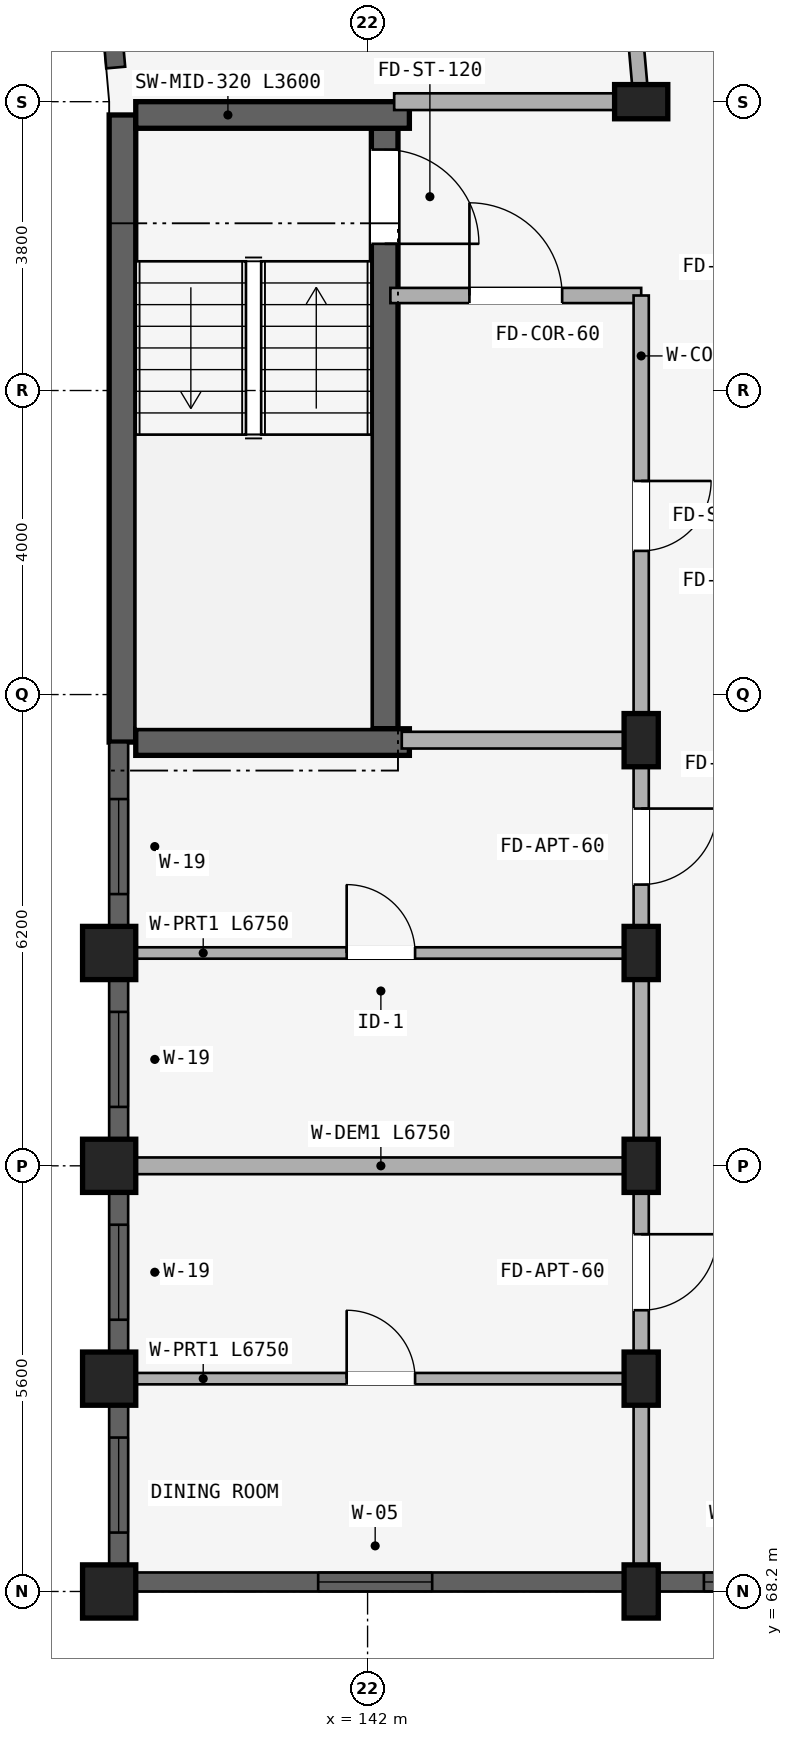
"""IFC4 building model, lengths in metres.
Left out: names, types, materials, properties, quantities, classifications, styles, units other than length and angle.
Written with IfcOpenShell. Run it as: python <this file> out.ifc"""

import sys

from ifc_helpers import new_model, si_unit, direction, frame, frame_2d, origin, origin_2d, place, context, subcontext, project, spatial, rectangle, extrude, element, fill, save


model = new_model("IFC4")
c1 = context("Model", 3, precision=1e-05, world=origin(), true_north=direction((0.0, 1.0)))
c2 = subcontext(c1, "Body", "Model", "MODEL_VIEW")
j1 = project(units=[si_unit("LENGTHUNIT", "METRE"), si_unit("PLANEANGLEUNIT", "RADIAN")], contexts=[c1])
p1 = place(None, origin())
s1 = spatial("IfcSite", under=j1, at=p1, CompositionType="ELEMENT")
p2 = place(p1, origin())
s2 = spatial("IfcBuilding", under=s1, at=p2, CompositionType="ELEMENT")
p3 = place(p2, frame((0.0, 0.0, 24.45)))
s3 = spatial("IfcBuildingStorey", under=s2, at=p3, CompositionType="ELEMENT", Elevation=24.45)
p4 = place(p3, frame((138.775, 87.625, 0.0), z_axis=(0.0, 0.0, 1.0), x_axis=(0.0, -1.0, 0.0)))
e1 = element("IfcWall", 1, at=p4, inside=s3, PredefinedType="SHEAR", context=c2, shape_type="SweptSolid", body=[
    extrude(rectangle(XDim=8.25, YDim=0.35, at=frame_2d((4.125, 0.0))), origin(), (0.0, 0.0, 1.0), 2.93),
])
p5 = place(p3, frame((142.225, 87.45, 0.0), z_axis=(0.0, 0.0, 1.0), x_axis=(0.0, -1.0, 0.0)))
e2 = element("IfcWall", 2, at=p5, inside=s3, PredefinedType="SHEAR", context=c2, shape_type="SweptSolid", body=[
    extrude(rectangle(XDim=7.9, YDim=0.35, at=frame_2d((3.95, 0.0))), origin(), (0.0, 0.0, 1.0), 2.93),
])
p6 = place(p5, frame((0.28, 0.0, 0.0)))
e3 = element("IfcOpeningElement", 3, at=p6, cuts=e2, PredefinedType="OPENING", context=c2, shape_type="SweptSolid", body=[
    extrude(rectangle(XDim=1.24, YDim=2.15, at=frame_2d((0.62, 1.075))), frame((0.0, 0.185, 0.0), z_axis=(0.0, -1.0, 0.0), x_axis=(1.0, 0.0, 0.0)), (0.0, 0.0, 1.0), 0.37),
])
for number, where, z_axis, x_axis in (
    (4, (138.95, 87.625, 0.0), (0.0, 0.0, 1.0), (1.0, 0.0, 0.0)),
    (5, (138.95, 79.375, 0.0), (0.0, 0.0, 1.0), (1.0, 0.0, 0.0)),
):
    element("IfcWall", number, at=place(p3, frame(where, z_axis=z_axis, x_axis=x_axis)), inside=s3, PredefinedType="SHEAR", context=c2, shape_type="SweptSolid", body=[
        extrude(rectangle(XDim=3.6, YDim=0.35, at=frame_2d((1.8, 0.0))), origin(), (0.0, 0.0, 1.0), 2.93),
    ])
for number, where, z_axis, x_axis in (
    (6, (145.6, 87.8, 0.0), (0.0, 0.0, 1.0), (0.0, 1.0, 0.0)),
    (7, (145.6, 79.4, 0.0), (0.0, 0.0, 1.0), (1.0, 0.0, 0.0)),
):
    element("IfcColumn", number, at=place(p3, frame(where, z_axis=z_axis, x_axis=x_axis)), inside=s3, PredefinedType="COLUMN", context=c2, shape_type="SweptSolid", body=[
        extrude(rectangle(XDim=0.45, YDim=0.7, at=origin_2d()), origin(), (0.0, 0.0, 1.0), 2.93),
    ])
p7 = place(p3, frame((138.6, 76.6, 0.0), z_axis=(0.0, 0.0, 1.0), x_axis=(1.0, 0.0, 0.0)))
e8 = element("IfcColumn", 8, at=p7, inside=s3, PredefinedType="COLUMN", context=c2, shape_type="SweptSolid", body=[
    extrude(rectangle(XDim=0.7, YDim=0.7, at=origin_2d()), origin(), (0.0, 0.0, 1.0), 2.93),
])
p8 = place(p3, frame((145.6, 76.6, 0.0), z_axis=(0.0, 0.0, 1.0), x_axis=(1.0, 0.0, 0.0)))
e9 = element("IfcColumn", 9, at=p8, inside=s3, PredefinedType="COLUMN", context=c2, shape_type="SweptSolid", body=[
    extrude(rectangle(XDim=0.45, YDim=0.7, at=origin_2d()), origin(), (0.0, 0.0, 1.0), 2.93),
])
p9 = place(p3, frame((138.6, 73.8, 0.0), z_axis=(0.0, 0.0, 1.0), x_axis=(1.0, 0.0, 0.0)))
e10 = element("IfcColumn", 10, at=p9, inside=s3, PredefinedType="COLUMN", context=c2, shape_type="SweptSolid", body=[
    extrude(rectangle(XDim=0.7, YDim=0.7, at=origin_2d()), origin(), (0.0, 0.0, 1.0), 2.93),
])
p10 = place(p3, frame((145.6, 73.8, 0.0), z_axis=(0.0, 0.0, 1.0), x_axis=(1.0, 0.0, 0.0)))
e11 = element("IfcColumn", 11, at=p10, inside=s3, PredefinedType="COLUMN", context=c2, shape_type="SweptSolid", body=[
    extrude(rectangle(XDim=0.45, YDim=0.7, at=origin_2d()), origin(), (0.0, 0.0, 1.0), 2.93),
])
p11 = place(p3, frame((138.6, 71.0, 0.0), z_axis=(0.0, 0.0, 1.0), x_axis=(1.0, 0.0, 0.0)))
e12 = element("IfcColumn", 12, at=p11, inside=s3, PredefinedType="COLUMN", context=c2, shape_type="SweptSolid", body=[
    extrude(rectangle(XDim=0.7, YDim=0.7, at=origin_2d()), origin(), (0.0, 0.0, 1.0), 2.93),
])
p12 = place(p3, frame((145.6, 71.0, 0.0), z_axis=(0.0, 0.0, 1.0), x_axis=(1.0, 0.0, 0.0)))
e13 = element("IfcColumn", 13, at=p12, inside=s3, PredefinedType="COLUMN", context=c2, shape_type="SweptSolid", body=[
    extrude(rectangle(XDim=0.45, YDim=0.7, at=origin_2d()), origin(), (0.0, 0.0, 1.0), 2.93),
])
p13 = place(p3, frame((138.6, 68.2, 0.0), z_axis=(0.0, 0.0, 1.0), x_axis=(1.0, 0.0, 0.0)))
e14 = element("IfcColumn", 14, at=p13, inside=s3, PredefinedType="COLUMN", context=c2, shape_type="SweptSolid", body=[
    extrude(rectangle(XDim=0.7, YDim=0.7, at=origin_2d()), origin(), (0.0, 0.0, 1.0), 2.97),
])
p14 = place(p3, frame((145.6, 68.2, 0.0), z_axis=(0.0, 0.0, 1.0), x_axis=(1.0, 0.0, 0.0)))
e15 = element("IfcColumn", 15, at=p14, inside=s3, PredefinedType="COLUMN", context=c2, shape_type="SweptSolid", body=[
    extrude(rectangle(XDim=0.45, YDim=0.7, at=origin_2d()), origin(), (0.0, 0.0, 1.0), 2.97),
])
p15 = place(p3, frame((142.3, 85.25, 0.0), z_axis=(0.0, 0.0, 1.0), x_axis=(1.0, 0.0, 0.0)))
e16 = element("IfcWall", 16, at=p15, inside=s3, PredefinedType="STANDARD", context=c2, shape_type="SweptSolid", body=[
    extrude(rectangle(XDim=3.3, YDim=0.2, at=frame_2d((1.65, 0.0))), origin(), (0.0, 0.0, 1.0), 2.372),
])
p16 = place(p15, frame((1.04, 0.0, 0.0)))
e17 = element("IfcOpeningElement", 17, at=p16, cuts=e16, PredefinedType="OPENING", context=c2, shape_type="SweptSolid", body=[
    extrude(rectangle(XDim=1.22, YDim=2.15, at=frame_2d((0.61, 1.075))), frame((0.0, 0.11, 0.0), z_axis=(0.0, -1.0, 0.0), x_axis=(1.0, 0.0, 0.0)), (0.0, 0.0, 1.0), 0.22),
])
p17 = place(p3, frame((145.6, 85.25, 0.0), z_axis=(0.0, 0.0, 1.0), x_axis=(0.0, -1.0, 0.0)))
e18 = element("IfcWall", 18, at=p17, inside=s3, PredefinedType="STANDARD", context=c2, shape_type="SweptSolid", body=[
    extrude(rectangle(XDim=5.8, YDim=0.2, at=frame_2d((2.9, 0.0))), origin(), (0.0, 0.0, 1.0), 2.372),
])
p18 = place(p17, frame((2.44, 0.0, 0.0)))
e19 = element("IfcOpeningElement", 19, at=p18, cuts=e18, PredefinedType="OPENING", context=c2, shape_type="SweptSolid", body=[
    extrude(rectangle(XDim=0.92, YDim=2.1, at=frame_2d((0.46, 1.05))), frame((0.0, 0.11, 0.0), z_axis=(0.0, -1.0, 0.0), x_axis=(1.0, 0.0, 0.0)), (0.0, 0.0, 1.0), 0.22),
])
p19 = place(p3, frame((145.208, 92.28, 0.0), z_axis=(0.0, 0.0, 1.0), x_axis=(0.087187153726, -0.996191949488, 0.0)))
e20 = element("IfcWall", 20, at=p19, inside=s3, PredefinedType="STANDARD", context=c2, shape_type="SweptSolid", body=[
    extrude(rectangle(XDim=4.497, YDim=0.2, at=frame_2d((2.249, 0.0))), origin(), (0.0, 0.0, 1.0), 2.372),
])
p20 = place(p3, frame((142.35, 87.8, 0.0), z_axis=(0.0, 0.0, 1.0), x_axis=(1.0, 0.0, 0.0)))
e21 = element("IfcWall", 21, at=p20, inside=s3, PredefinedType="STANDARD", context=c2, shape_type="SweptSolid", body=[
    extrude(rectangle(XDim=3.2, YDim=0.22, at=frame_2d((1.6, 0.0))), origin(), (0.0, 0.0, 1.0), 2.372),
])
p21 = place(p3, frame((145.6, 79.4, 0.0), z_axis=(0.0, 0.0, 1.0), x_axis=(0.0, -1.0, 0.0)))
e22 = element("IfcWall", 22, at=p21, inside=s3, PredefinedType="STANDARD", context=c2, shape_type="SweptSolid", body=[
    extrude(rectangle(XDim=2.8, YDim=0.2, at=frame_2d((1.4, 0.0))), origin(), (0.0, 0.0, 1.0), 2.372),
])
p22 = place(p21, frame((0.9, 0.0, 0.0)))
e23 = element("IfcOpeningElement", 23, at=p22, cuts=e22, PredefinedType="OPENING", context=c2, shape_type="SweptSolid", body=[
    extrude(rectangle(XDim=1.0, YDim=2.15, at=frame_2d((0.5, 1.075))), frame((0.0, 0.11, 0.0), z_axis=(0.0, -1.0, 0.0), x_axis=(1.0, 0.0, 0.0)), (0.0, 0.0, 1.0), 0.22),
])
p23 = place(p3, frame((142.45, 79.4, 0.0), z_axis=(0.0, 0.0, 1.0), x_axis=(1.0, 0.0, 0.0)))
e24 = element("IfcWall", 24, at=p23, inside=s3, PredefinedType="STANDARD", context=c2, shape_type="SweptSolid", body=[
    extrude(rectangle(XDim=3.1, YDim=0.22, at=frame_2d((1.55, 0.0))), origin(), (0.0, 0.0, 1.0), 2.372),
])
p24 = place(p3, frame((145.6, 76.6, 0.0), z_axis=(0.0, 0.0, 1.0), x_axis=(0.0, -1.0, 0.0)))
e25 = element("IfcWall", 25, at=p24, inside=s3, PredefinedType="STANDARD", context=c2, shape_type="SweptSolid", body=[
    extrude(rectangle(XDim=2.8, YDim=0.2, at=frame_2d((1.4, 0.0))), origin(), (0.0, 0.0, 1.0), 2.372),
])
p25 = place(p3, frame((138.8, 76.6, 0.0), z_axis=(0.0, 0.0, 1.0), x_axis=(1.0, 0.0, 0.0)))
e26 = element("IfcWall", 26, at=p25, inside=s3, PredefinedType="PARTITIONING", context=c2, shape_type="SweptSolid", body=[
    extrude(rectangle(XDim=6.75, YDim=0.15, at=frame_2d((3.375, 0.0))), origin(), (0.0, 0.0, 1.0), 2.372),
])
p26 = place(p25, frame((2.925, 0.0, 0.0)))
e27 = element("IfcOpeningElement", 27, at=p26, cuts=e26, PredefinedType="OPENING", context=c2, shape_type="SweptSolid", body=[
    extrude(rectangle(XDim=0.9, YDim=2.1, at=frame_2d((0.45, 1.05))), frame((0.0, 0.085, 0.0), z_axis=(0.0, -1.0, 0.0), x_axis=(1.0, 0.0, 0.0)), (0.0, 0.0, 1.0), 0.17),
])
p27 = place(p3, frame((145.6, 73.8, 0.0), z_axis=(0.0, 0.0, 1.0), x_axis=(0.0, -1.0, 0.0)))
e28 = element("IfcWall", 28, at=p27, inside=s3, PredefinedType="STANDARD", context=c2, shape_type="SweptSolid", body=[
    extrude(rectangle(XDim=2.8, YDim=0.2, at=frame_2d((1.4, 0.0))), origin(), (0.0, 0.0, 1.0), 2.372),
])
p28 = place(p27, frame((0.9, 0.0, 0.0)))
e29 = element("IfcOpeningElement", 29, at=p28, cuts=e28, PredefinedType="OPENING", context=c2, shape_type="SweptSolid", body=[
    extrude(rectangle(XDim=1.0, YDim=2.15, at=frame_2d((0.5, 1.075))), frame((0.0, 0.11, 0.0), z_axis=(0.0, -1.0, 0.0), x_axis=(1.0, 0.0, 0.0)), (0.0, 0.0, 1.0), 0.22),
])
p29 = place(p3, frame((138.8, 73.8, 0.0), z_axis=(0.0, 0.0, 1.0), x_axis=(1.0, 0.0, 0.0)))
e30 = element("IfcWall", 30, at=p29, inside=s3, PredefinedType="STANDARD", context=c2, shape_type="SweptSolid", body=[
    extrude(rectangle(XDim=6.75, YDim=0.22, at=frame_2d((3.375, 0.0))), origin(), (0.0, 0.0, 1.0), 2.372),
])
p30 = place(p3, frame((145.6, 71.0, 0.0), z_axis=(0.0, 0.0, 1.0), x_axis=(0.0, -1.0, 0.0)))
e31 = element("IfcWall", 31, at=p30, inside=s3, PredefinedType="STANDARD", context=c2, shape_type="SweptSolid", body=[
    extrude(rectangle(XDim=2.8, YDim=0.2, at=frame_2d((1.4, 0.0))), origin(), (0.0, 0.0, 1.0), 2.372),
])
p31 = place(p3, frame((138.8, 71.0, 0.0), z_axis=(0.0, 0.0, 1.0), x_axis=(1.0, 0.0, 0.0)))
e32 = element("IfcWall", 32, at=p31, inside=s3, PredefinedType="PARTITIONING", context=c2, shape_type="SweptSolid", body=[
    extrude(rectangle(XDim=6.75, YDim=0.15, at=frame_2d((3.375, 0.0))), origin(), (0.0, 0.0, 1.0), 2.372),
])
p32 = place(p31, frame((2.925, 0.0, 0.0)))
e33 = element("IfcOpeningElement", 33, at=p32, cuts=e32, PredefinedType="OPENING", context=c2, shape_type="SweptSolid", body=[
    extrude(rectangle(XDim=0.9, YDim=2.1, at=frame_2d((0.45, 1.05))), frame((0.0, 0.085, 0.0), z_axis=(0.0, -1.0, 0.0), x_axis=(1.0, 0.0, 0.0)), (0.0, 0.0, 1.0), 0.17),
])
p33 = place(p3, frame((138.461, 90.823, 0.0), z_axis=(0.0, 0.0, 1.0), x_axis=(0.087229084652, -0.996188278786, 0.0)))
e34 = element("IfcWall", 34, at=p33, inside=s3, PredefinedType="STANDARD", context=c2, shape_type="SweptSolid", body=[
    extrude(rectangle(XDim=2.583, YDim=0.25, at=frame_2d((1.292, 0.0))), origin(), (0.0, 0.0, 1.0), 2.422),
])
p34 = place(p33, frame((0.61, 0.0, 0.622)))
e35 = element("IfcOpeningElement", 35, at=p34, cuts=e34, PredefinedType="OPENING", context=c2, shape_type="SweptSolid", body=[
    extrude(rectangle(XDim=1.55, YDim=1.6, at=frame_2d((0.775, 0.8))), frame((0.0, 0.135, 0.0), z_axis=(0.0, -1.0, 0.0), x_axis=(1.0, 0.0, 0.0)), (0.0, 0.0, 1.0), 0.27),
])
p35 = place(p3, frame((138.725, 79.372, 0.0), z_axis=(0.0, 0.0, 1.0), x_axis=(0.0, -1.0, 0.0)))
e36 = element("IfcWall", 36, at=p35, inside=s3, PredefinedType="STANDARD", context=c2, shape_type="SweptSolid", body=[
    extrude(rectangle(XDim=2.418, YDim=0.25, at=frame_2d((1.209, 0.0))), origin(), (0.0, 0.0, 1.0), 2.472),
])
p36 = place(p35, frame((0.747, 0.0, 0.722)))
e37 = element("IfcOpeningElement", 37, at=p36, cuts=e36, PredefinedType="OPENING", context=c2, shape_type="SweptSolid", body=[
    extrude(rectangle(XDim=1.25, YDim=1.55, at=frame_2d((0.625, 0.775))), frame((0.0, 0.135, 0.0), z_axis=(0.0, -1.0, 0.0), x_axis=(1.0, 0.0, 0.0)), (0.0, 0.0, 1.0), 0.27),
])
p37 = place(p3, frame((138.725, 76.247, 0.0), z_axis=(0.0, 0.0, 1.0), x_axis=(0.0, -1.0, 0.0)))
e38 = element("IfcWall", 38, at=p37, inside=s3, PredefinedType="STANDARD", context=c2, shape_type="SweptSolid", body=[
    extrude(rectangle(XDim=2.093, YDim=0.25, at=frame_2d((1.046, 0.0))), origin(), (0.0, 0.0, 1.0), 2.472),
])
p38 = place(p37, frame((0.421, 0.0, 0.722)))
e39 = element("IfcOpeningElement", 39, at=p38, cuts=e38, PredefinedType="OPENING", context=c2, shape_type="SweptSolid", body=[
    extrude(rectangle(XDim=1.25, YDim=1.55, at=frame_2d((0.625, 0.775))), frame((0.0, 0.135, 0.0), z_axis=(0.0, -1.0, 0.0), x_axis=(1.0, 0.0, 0.0)), (0.0, 0.0, 1.0), 0.27),
])
p39 = place(p3, frame((138.725, 73.447, 0.0), z_axis=(0.0, 0.0, 1.0), x_axis=(0.0, -1.0, 0.0)))
e40 = element("IfcWall", 40, at=p39, inside=s3, PredefinedType="STANDARD", context=c2, shape_type="SweptSolid", body=[
    extrude(rectangle(XDim=2.093, YDim=0.25, at=frame_2d((1.046, 0.0))), origin(), (0.0, 0.0, 1.0), 2.472),
])
p40 = place(p39, frame((0.421, 0.0, 0.722)))
e41 = element("IfcOpeningElement", 41, at=p40, cuts=e40, PredefinedType="OPENING", context=c2, shape_type="SweptSolid", body=[
    extrude(rectangle(XDim=1.25, YDim=1.55, at=frame_2d((0.625, 0.775))), frame((0.0, 0.135, 0.0), z_axis=(0.0, -1.0, 0.0), x_axis=(1.0, 0.0, 0.0)), (0.0, 0.0, 1.0), 0.27),
])
p41 = place(p3, frame((138.725, 70.646, 0.0), z_axis=(0.0, 0.0, 1.0), x_axis=(0.0, -1.0, 0.0)))
e42 = element("IfcWall", 42, at=p41, inside=s3, PredefinedType="STANDARD", context=c2, shape_type="SweptSolid", body=[
    extrude(rectangle(XDim=2.093, YDim=0.25, at=frame_2d((1.046, 0.0))), origin(), (0.0, 0.0, 1.0), 2.472),
])
p42 = place(p41, frame((0.421, 0.0, 0.722)))
e43 = element("IfcOpeningElement", 43, at=p42, cuts=e42, PredefinedType="OPENING", context=c2, shape_type="SweptSolid", body=[
    extrude(rectangle(XDim=1.25, YDim=1.55, at=frame_2d((0.625, 0.775))), frame((0.0, 0.135, 0.0), z_axis=(0.0, -1.0, 0.0), x_axis=(1.0, 0.0, 0.0)), (0.0, 0.0, 1.0), 0.27),
])
p43 = place(p3, frame((138.954, 68.325, 0.0), z_axis=(0.0, 0.0, 1.0), x_axis=(1.0, 0.0, 0.0)))
e44 = element("IfcWall", 44, at=p43, inside=s3, PredefinedType="STANDARD", context=c2, shape_type="SweptSolid", body=[
    extrude(rectangle(XDim=6.418, YDim=0.25, at=frame_2d((3.209, 0.0))), origin(), (0.0, 0.0, 1.0), 2.372),
])
p44 = place(p43, frame((2.396, 0.0, 0.522)))
e45 = element("IfcOpeningElement", 45, at=p44, cuts=e44, PredefinedType="OPENING", context=c2, shape_type="SweptSolid", body=[
    extrude(rectangle(XDim=1.5, YDim=1.65, at=frame_2d((0.75, 0.825))), frame((0.0, 0.135, 0.0), z_axis=(0.0, -1.0, 0.0), x_axis=(1.0, 0.0, 0.0)), (0.0, 0.0, 1.0), 0.27),
])
p45 = place(p3, frame((145.829, 68.325, 0.0), z_axis=(0.0, 0.0, 1.0), x_axis=(1.0, 0.0, 0.0)))
e46 = element("IfcWall", 46, at=p45, inside=s3, PredefinedType="STANDARD", context=c2, shape_type="SweptSolid", body=[
    extrude(rectangle(XDim=1.943, YDim=0.25, at=frame_2d((0.971, 0.0))), origin(), (0.0, 0.0, 1.0), 2.372),
])
p46 = place(p45, frame((0.596, 0.0, 0.88)))
e47 = element("IfcOpeningElement", 47, at=p46, cuts=e46, PredefinedType="OPENING", context=c2, shape_type="SweptSolid", body=[
    extrude(rectangle(XDim=0.75, YDim=1.05, at=frame_2d((0.375, 0.525))), frame((0.0, 0.135, 0.0), z_axis=(0.0, -1.0, 0.0), x_axis=(1.0, 0.0, 0.0)), (0.0, 0.0, 1.0), 0.27),
])
p47 = place(p36, origin())
e48 = element("IfcWindow", 48, at=p47, inside=s3, PartitioningType="SINGLE_PANEL", PredefinedType="WINDOW", context=c2, shape_type="SweptSolid", body=[
    extrude(rectangle(XDim=1.25, YDim=1.55, at=frame_2d((0.625, 0.775))), frame((0.0, 0.03, 0.0), z_axis=(0.0, -1.0, 0.0), x_axis=(1.0, 0.0, 0.0)), (0.0, 0.0, 1.0), 0.06),
])
fill(e37, e48)
p48 = place(p38, origin())
e49 = element("IfcWindow", 49, at=p48, inside=s3, PartitioningType="SINGLE_PANEL", PredefinedType="WINDOW", context=c2, shape_type="SweptSolid", body=[
    extrude(rectangle(XDim=1.25, YDim=1.55, at=frame_2d((0.625, 0.775))), frame((0.0, 0.03, 0.0), z_axis=(0.0, -1.0, 0.0), x_axis=(1.0, 0.0, 0.0)), (0.0, 0.0, 1.0), 0.06),
])
fill(e39, e49)
p49 = place(p40, origin())
e50 = element("IfcWindow", 50, at=p49, inside=s3, PartitioningType="SINGLE_PANEL", PredefinedType="WINDOW", context=c2, shape_type="SweptSolid", body=[
    extrude(rectangle(XDim=1.25, YDim=1.55, at=frame_2d((0.625, 0.775))), frame((0.0, 0.03, 0.0), z_axis=(0.0, -1.0, 0.0), x_axis=(1.0, 0.0, 0.0)), (0.0, 0.0, 1.0), 0.06),
])
fill(e41, e50)
p50 = place(p42, origin())
e51 = element("IfcWindow", 51, at=p50, inside=s3, PartitioningType="SINGLE_PANEL", PredefinedType="WINDOW", context=c2, shape_type="SweptSolid", body=[
    extrude(rectangle(XDim=1.25, YDim=1.55, at=frame_2d((0.625, 0.775))), frame((0.0, 0.03, 0.0), z_axis=(0.0, -1.0, 0.0), x_axis=(1.0, 0.0, 0.0)), (0.0, 0.0, 1.0), 0.06),
])
fill(e43, e51)
p51 = place(p44, origin())
e52 = element("IfcWindow", 52, at=p51, inside=s3, PartitioningType="DOUBLE_PANEL_VERTICAL", PredefinedType="WINDOW", context=c2, shape_type="SweptSolid", body=[
    extrude(rectangle(XDim=1.5, YDim=1.65, at=frame_2d((0.75, 0.825))), frame((0.0, 0.03, 0.0), z_axis=(0.0, -1.0, 0.0), x_axis=(1.0, 0.0, 0.0)), (0.0, 0.0, 1.0), 0.06),
])
fill(e45, e52)
p52 = place(p46, origin())
e53 = element("IfcWindow", 53, at=p52, inside=s3, PartitioningType="SINGLE_PANEL", PredefinedType="WINDOW", context=c2, shape_type="SweptSolid", body=[
    extrude(rectangle(XDim=0.75, YDim=1.05, at=frame_2d((0.375, 0.525))), frame((0.0, 0.03, 0.0), z_axis=(0.0, -1.0, 0.0), x_axis=(1.0, 0.0, 0.0)), (0.0, 0.0, 1.0), 0.06),
])
fill(e47, e53)
p53 = place(p6, frame((1.24, 0.0, 0.0), z_axis=(0.0, 0.0, 1.0), x_axis=(-1.0, 0.0, 0.0)))
e54 = element("IfcDoor", 54, at=p53, inside=s3, OperationType="SINGLE_SWING_LEFT", PredefinedType="DOOR", context=c2, shape_type="SweptSolid", body=[
    extrude(rectangle(XDim=1.24, YDim=2.15, at=frame_2d((0.62, 1.075))), frame((0.0, 0.025, 0.0), z_axis=(0.0, -1.0, 0.0), x_axis=(1.0, 0.0, 0.0)), (0.0, 0.0, 1.0), 0.05),
])
fill(e3, e54)
p54 = place(p16, origin())
e55 = element("IfcDoor", 55, at=p54, inside=s3, OperationType="SINGLE_SWING_LEFT", PredefinedType="DOOR", context=c2, shape_type="SweptSolid", body=[
    extrude(rectangle(XDim=1.22, YDim=2.15, at=frame_2d((0.61, 1.075))), frame((0.0, 0.025, 0.0), z_axis=(0.0, -1.0, 0.0), x_axis=(1.0, 0.0, 0.0)), (0.0, 0.0, 1.0), 0.05),
])
fill(e17, e55)
p55 = place(p18, frame((0.92, 0.0, 0.0), z_axis=(0.0, 0.0, 1.0), x_axis=(-1.0, 0.0, 0.0)))
e56 = element("IfcDoor", 56, at=p55, inside=s3, OperationType="SINGLE_SWING_RIGHT", PredefinedType="DOOR", context=c2, shape_type="SweptSolid", body=[
    extrude(rectangle(XDim=0.92, YDim=2.1, at=frame_2d((0.46, 1.05))), frame((0.0, 0.025, 0.0), z_axis=(0.0, -1.0, 0.0), x_axis=(1.0, 0.0, 0.0)), (0.0, 0.0, 1.0), 0.05),
])
fill(e19, e56)
p56 = place(p22, origin())
e57 = element("IfcDoor", 57, at=p56, inside=s3, OperationType="SINGLE_SWING_LEFT", PredefinedType="DOOR", context=c2, shape_type="SweptSolid", body=[
    extrude(rectangle(XDim=1.0, YDim=2.15, at=frame_2d((0.5, 1.075))), frame((0.0, 0.025, 0.0), z_axis=(0.0, -1.0, 0.0), x_axis=(1.0, 0.0, 0.0)), (0.0, 0.0, 1.0), 0.05),
])
fill(e23, e57)
p57 = place(p26, origin())
e58 = element("IfcDoor", 58, at=p57, inside=s3, OperationType="SINGLE_SWING_LEFT", PredefinedType="DOOR", context=c2, shape_type="SweptSolid", body=[
    extrude(rectangle(XDim=0.9, YDim=2.1, at=frame_2d((0.45, 1.05))), frame((0.0, 0.025, 0.0), z_axis=(0.0, -1.0, 0.0), x_axis=(1.0, 0.0, 0.0)), (0.0, 0.0, 1.0), 0.05),
])
fill(e27, e58)
p58 = place(p28, origin())
e59 = element("IfcDoor", 59, at=p58, inside=s3, OperationType="SINGLE_SWING_LEFT", PredefinedType="DOOR", context=c2, shape_type="SweptSolid", body=[
    extrude(rectangle(XDim=1.0, YDim=2.15, at=frame_2d((0.5, 1.075))), frame((0.0, 0.025, 0.0), z_axis=(0.0, -1.0, 0.0), x_axis=(1.0, 0.0, 0.0)), (0.0, 0.0, 1.0), 0.05),
])
fill(e29, e59)
p59 = place(p32, origin())
e60 = element("IfcDoor", 60, at=p59, inside=s3, OperationType="SINGLE_SWING_LEFT", PredefinedType="DOOR", context=c2, shape_type="SweptSolid", body=[
    extrude(rectangle(XDim=0.9, YDim=2.1, at=frame_2d((0.45, 1.05))), frame((0.0, 0.025, 0.0), z_axis=(0.0, -1.0, 0.0), x_axis=(1.0, 0.0, 0.0)), (0.0, 0.0, 1.0), 0.05),
])
fill(e33, e60)
save(model, sys.argv[1])
